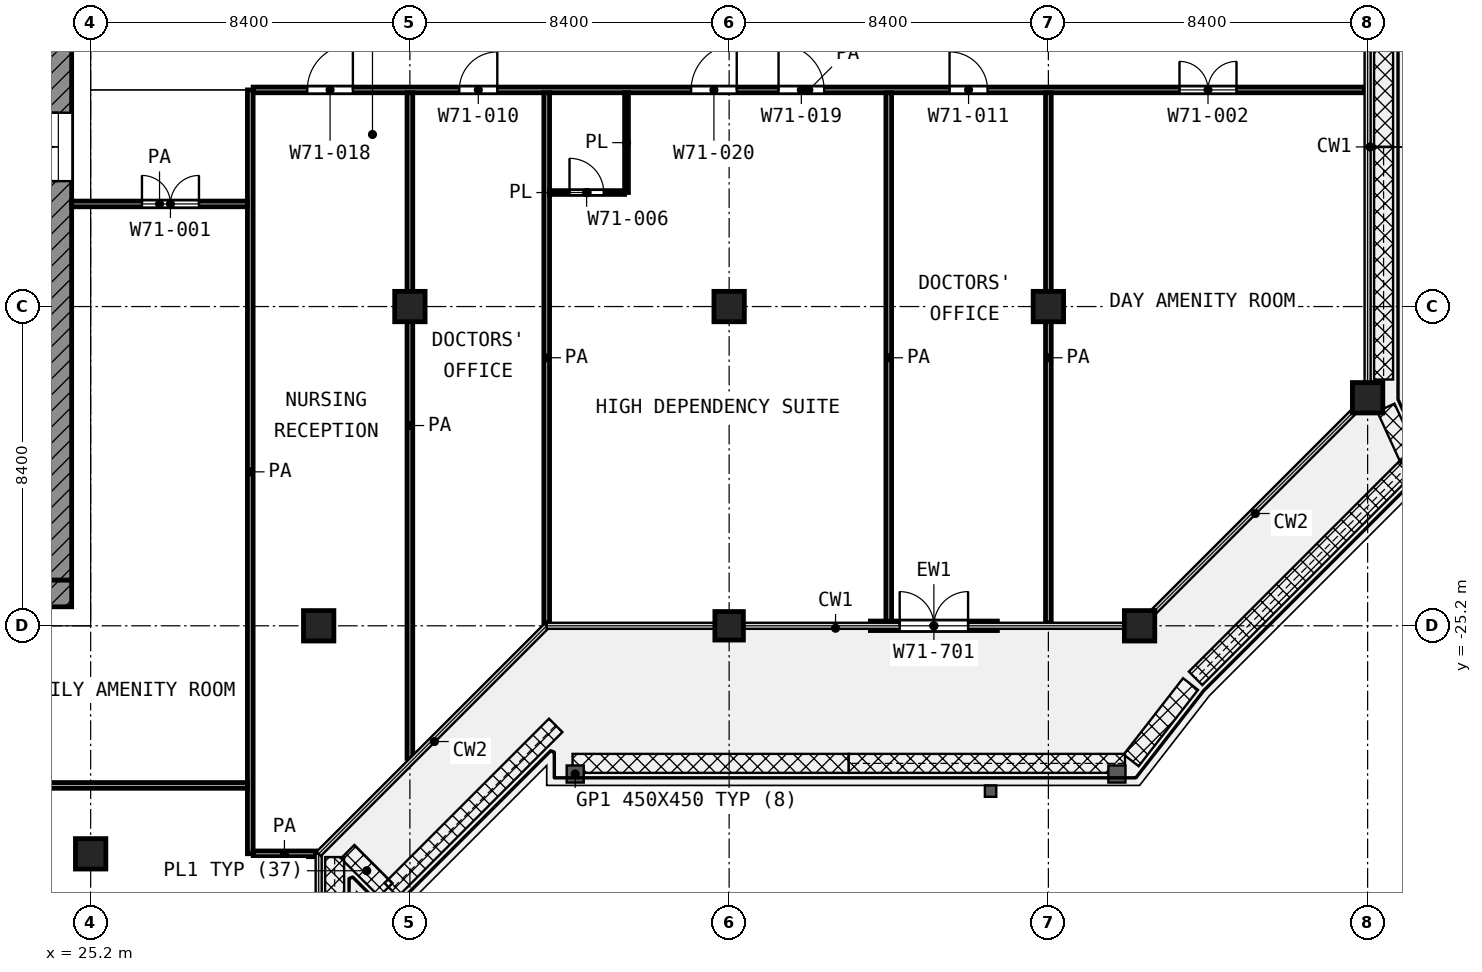
"""IFC4 building model, lengths in metres.
Left out: names, types, materials, properties, quantities, classifications, styles, units other than length and angle.
Written with IfcOpenShell. Run it as: python <this file> out.ifc"""

import sys

from ifc_helpers import new_model, si_unit, direction, frame, frame_2d, origin, origin_2d, place, context, subcontext, project, spatial, rectangle, extrude, element, fill, save


model = new_model("IFC4")
c1 = context("Model", 3, precision=1e-05, world=origin(), true_north=direction((0.0, 1.0)))
c2 = subcontext(c1, "Body", "Model", "MODEL_VIEW")
j1 = project(units=[si_unit("LENGTHUNIT", "METRE"), si_unit("PLANEANGLEUNIT", "RADIAN")], contexts=[c1])
p1 = place(None, origin())
s1 = spatial("IfcSite", under=j1, at=p1, CompositionType="ELEMENT")
p2 = place(p1, origin())
s2 = spatial("IfcBuilding", under=s1, at=p2, CompositionType="ELEMENT")
p3 = place(p2, frame((0.0, 0.0, 307.0)))
s3 = spatial("IfcBuildingStorey", under=s2, at=p3, CompositionType="ELEMENT", Elevation=307.0)
for number, where, z_axis, x_axis in (
    (1, (33.6, -16.8, 0.0), (0.0, 0.0, 1.0), (1.0, 0.0, 0.0)),
    (2, (42.0, -16.8, 0.0), (0.0, 0.0, 1.0), (1.0, 0.0, 0.0)),
    (3, (50.4, -16.8, 0.0), (0.0, 0.0, 1.0), (1.0, 0.0, 0.0)),
    (4, (58.8, -19.2, 0.0), (0.0, 0.0, 1.0), (1.0, 0.0, 0.0)),
    (5, (31.2, -25.2, 0.0), (0.0, 0.0, 1.0), (1.0, 0.0, 0.0)),
):
    element("IfcColumn", number, at=place(p3, frame(where, z_axis=z_axis, x_axis=x_axis)), inside=s3, PredefinedType="COLUMN", context=c2, shape_type="SweptSolid", body=[
        extrude(rectangle(XDim=0.8, YDim=0.8, at=origin_2d()), origin(), (0.0, 0.0, 1.0), 4.2),
    ])
p4 = place(p3, frame((42.0, -25.2, 0.0), z_axis=(0.0, 0.0, 1.0), x_axis=(1.0, 0.0, 0.0)))
e6 = element("IfcColumn", 6, at=p4, inside=s3, PredefinedType="COLUMN", context=c2, shape_type="SweptSolid", body=[
    extrude(rectangle(XDim=0.75, YDim=0.75, at=origin_2d()), origin(), (0.0, 0.0, 1.0), 4.2),
])
for number, where, z_axis, x_axis in (
    (7, (52.8, -25.2, 0.0), (0.0, 0.0, 1.0), (1.0, 0.0, 0.0)),
    (8, (25.2, -31.2, 0.0), (0.0, 0.0, 1.0), (1.0, 0.0, 0.0)),
):
    element("IfcColumn", number, at=place(p3, frame(where, z_axis=z_axis, x_axis=x_axis)), inside=s3, PredefinedType="COLUMN", context=c2, shape_type="SweptSolid", body=[
        extrude(rectangle(XDim=0.8, YDim=0.8, at=origin_2d()), origin(), (0.0, 0.0, 1.0), 4.2),
    ])
p5 = place(p3, frame((45.717, -25.2, 0.0), z_axis=(0.0, 0.0, 1.0), x_axis=(1.0, 0.0, 0.0)))
e9 = element("IfcWall", 9, at=p5, inside=s3, PredefinedType="SOLIDWALL", context=c2, shape_type="SweptSolid", body=[
    extrude(rectangle(XDim=3.342, YDim=0.25, at=frame_2d((1.671, 0.0))), origin(), (0.0, 0.0, 1.0), 3.48),
])
p6 = place(p5, frame((0.771, 0.0, 0.0)))
e10 = element("IfcOpeningElement", 10, at=p6, cuts=e9, PredefinedType="OPENING", context=c2, shape_type="SweptSolid", body=[
    extrude(rectangle(XDim=1.8, YDim=2.1, at=frame_2d((0.9, 1.05))), frame((0.0, 0.135, 0.0), z_axis=(0.0, -1.0, 0.0), x_axis=(1.0, 0.0, 0.0)), (0.0, 0.0, 1.0), 0.27),
])
p7 = place(p3, frame((24.35, -24.0, 0.0), z_axis=(0.0, 0.0, 1.0), x_axis=(0.0, 1.0, 0.0)))
e11 = element("IfcWall", 11, at=p7, inside=s3, PredefinedType="SHEAR", context=c2, shape_type="SweptSolid", body=[
    extrude(rectangle(XDim=18.6, YDim=0.7, at=frame_2d((9.3, 0.0))), origin(), (0.0, 0.0, 1.0), 3.6),
])
p8 = place(p7, frame((10.5, 0.0, 0.0)))
e12 = element("IfcOpeningElement", 12, at=p8, cuts=e11, PredefinedType="OPENING", context=c2, shape_type="SweptSolid", body=[
    extrude(rectangle(XDim=1.8, YDim=2.1, at=frame_2d((0.9, 1.05))), frame((0.0, 0.36, 0.0), z_axis=(0.0, -1.0, 0.0), x_axis=(1.0, 0.0, 0.0)), (0.0, 0.0, 1.0), 0.72),
])
p9 = place(p3, frame((24.35, -24.7, 0.0), z_axis=(0.0, 0.0, 1.0), x_axis=(0.0, 1.0, 0.0)))
e13 = element("IfcWall", 13, at=p9, inside=s3, PredefinedType="SHEAR", context=c2, shape_type="SweptSolid", body=[
    extrude(rectangle(XDim=0.7, YDim=0.7, at=frame_2d((0.35, 0.0))), origin(), (0.0, 0.0, 1.0), 3.6),
])
p10 = place(p3, frame((37.275, -13.8, 0.0), z_axis=(0.0, 0.0, 1.0), x_axis=(1.0, 0.0, 0.0)))
e14 = element("IfcWall", 14, at=p10, inside=s3, PredefinedType="PARTITIONING", context=c2, shape_type="SweptSolid", body=[
    extrude(rectangle(XDim=1.975, YDim=0.1, at=frame_2d((0.988, 0.0))), origin(), (0.0, 0.0, 1.0), 3.6),
])
p11 = place(p10, frame((0.525, 0.0, 0.0)))
e15 = element("IfcOpeningElement", 15, at=p11, cuts=e14, PredefinedType="OPENING", context=c2, shape_type="SweptSolid", body=[
    extrude(rectangle(XDim=0.9, YDim=2.1, at=frame_2d((0.45, 1.05))), frame((0.0, 0.06, 0.0), z_axis=(0.0, -1.0, 0.0), x_axis=(1.0, 0.0, 0.0)), (0.0, 0.0, 1.0), 0.12),
])
p12 = place(p3, frame((39.3, -13.8, 0.0), z_axis=(0.0, 0.0, 1.0), x_axis=(0.0, 1.0, 0.0)))
e16 = element("IfcWall", 16, at=p12, inside=s3, PredefinedType="PARTITIONING", context=c2, shape_type="SweptSolid", body=[
    extrude(rectangle(XDim=2.625, YDim=0.1, at=frame_2d((1.312, 0.0))), origin(), (0.0, 0.0, 1.0), 3.6),
])
p13 = place(p3, frame((29.477, -31.2, 0.0), z_axis=(0.0, 0.0, 1.0), x_axis=(1.0, 0.0, 0.0)))
e17 = element("IfcWall", 17, at=p13, inside=s3, PredefinedType="PARTITIONING", context=c2, shape_type="SweptSolid", body=[
    extrude(rectangle(XDim=1.643, YDim=0.15, at=frame_2d((0.822, 0.0))), origin(), (0.0, 0.0, 1.0), 3.6),
])
p14 = place(p3, frame((11.175, -29.4, 0.0), z_axis=(0.0, 0.0, 1.0), x_axis=(1.0, 0.0, 0.0)))
e18 = element("IfcWall", 18, at=p14, inside=s3, PredefinedType="PARTITIONING", context=c2, shape_type="SweptSolid", body=[
    extrude(rectangle(XDim=18.15, YDim=0.15, at=frame_2d((9.075, 0.0))), origin(), (0.0, 0.0, 1.0), 3.6),
])
p15 = place(p3, frame((24.7, -14.1, 0.0), z_axis=(0.0, 0.0, 1.0), x_axis=(1.0, 0.0, 0.0)))
e19 = element("IfcWall", 19, at=p15, inside=s3, PredefinedType="PARTITIONING", context=c2, shape_type="SweptSolid", body=[
    extrude(rectangle(XDim=4.625, YDim=0.15, at=frame_2d((2.312, 0.0))), origin(), (0.0, 0.0, 1.0), 3.6),
])
p16 = place(p15, frame((1.85, 0.0, 0.0)))
e20 = element("IfcOpeningElement", 20, at=p16, cuts=e19, PredefinedType="OPENING", context=c2, shape_type="SweptSolid", body=[
    extrude(rectangle(XDim=1.5, YDim=2.1, at=frame_2d((0.75, 1.05))), frame((0.0, 0.085, 0.0), z_axis=(0.0, -1.0, 0.0), x_axis=(1.0, 0.0, 0.0)), (0.0, 0.0, 1.0), 0.17),
])
p17 = place(p3, frame((29.475, -11.1, 0.0), z_axis=(0.0, 0.0, 1.0), x_axis=(1.0, 0.0, 0.0)))
e21 = element("IfcWall", 21, at=p17, inside=s3, PredefinedType="PARTITIONING", context=c2, shape_type="SweptSolid", body=[
    extrude(rectangle(XDim=29.245, YDim=0.15, at=frame_2d((14.623, 0.0))), origin(), (0.0, 0.0, 1.0), 3.6),
])
p18 = place(p17, frame((1.425, 0.0, 0.0)))
e22 = element("IfcOpeningElement", 22, at=p18, cuts=e21, PredefinedType="OPENING", context=c2, shape_type="SweptSolid", body=[
    extrude(rectangle(XDim=1.2, YDim=2.1, at=frame_2d((0.6, 1.05))), frame((0.0, 0.085, 0.0), z_axis=(0.0, -1.0, 0.0), x_axis=(1.0, 0.0, 0.0)), (0.0, 0.0, 1.0), 0.17),
])
p19 = place(p17, frame((5.425, 0.0, 0.0)))
e23 = element("IfcOpeningElement", 23, at=p19, cuts=e21, PredefinedType="OPENING", context=c2, shape_type="SweptSolid", body=[
    extrude(rectangle(XDim=1.0, YDim=2.1, at=frame_2d((0.5, 1.05))), frame((0.0, 0.085, 0.0), z_axis=(0.0, -1.0, 0.0), x_axis=(1.0, 0.0, 0.0)), (0.0, 0.0, 1.0), 0.17),
])
p20 = place(p17, frame((13.825, 0.0, 0.0)))
e24 = element("IfcOpeningElement", 24, at=p20, cuts=e21, PredefinedType="OPENING", context=c2, shape_type="SweptSolid", body=[
    extrude(rectangle(XDim=1.2, YDim=2.1, at=frame_2d((0.6, 1.05))), frame((0.0, 0.085, 0.0), z_axis=(0.0, -1.0, 0.0), x_axis=(1.0, 0.0, 0.0)), (0.0, 0.0, 1.0), 0.17),
])
p21 = place(p17, frame((11.525, 0.0, 0.0)))
e25 = element("IfcOpeningElement", 25, at=p21, cuts=e21, PredefinedType="OPENING", context=c2, shape_type="SweptSolid", body=[
    extrude(rectangle(XDim=1.2, YDim=2.1, at=frame_2d((0.6, 1.05))), frame((0.0, 0.085, 0.0), z_axis=(0.0, -1.0, 0.0), x_axis=(1.0, 0.0, 0.0)), (0.0, 0.0, 1.0), 0.17),
])
p22 = place(p17, frame((18.325, 0.0, 0.0)))
e26 = element("IfcOpeningElement", 26, at=p22, cuts=e21, PredefinedType="OPENING", context=c2, shape_type="SweptSolid", body=[
    extrude(rectangle(XDim=1.0, YDim=2.1, at=frame_2d((0.5, 1.05))), frame((0.0, 0.085, 0.0), z_axis=(0.0, -1.0, 0.0), x_axis=(1.0, 0.0, 0.0)), (0.0, 0.0, 1.0), 0.17),
])
p23 = place(p17, frame((24.375, 0.0, 0.0)))
e27 = element("IfcOpeningElement", 27, at=p23, cuts=e21, PredefinedType="OPENING", context=c2, shape_type="SweptSolid", body=[
    extrude(rectangle(XDim=1.5, YDim=2.1, at=frame_2d((0.75, 1.05))), frame((0.0, 0.085, 0.0), z_axis=(0.0, -1.0, 0.0), x_axis=(1.0, 0.0, 0.0)), (0.0, 0.0, 1.0), 0.17),
])
p24 = place(p3, frame((29.4, -31.198, 0.0), z_axis=(0.0, 0.0, 1.0), x_axis=(0.0, 1.0, 0.0)))
e28 = element("IfcWall", 28, at=p24, inside=s3, PredefinedType="PARTITIONING", context=c2, shape_type="SweptSolid", body=[
    extrude(rectangle(XDim=20.098, YDim=0.15, at=frame_2d((10.049, 0.0))), origin(), (0.0, 0.0, 1.0), 3.6),
])
p25 = place(p3, frame((33.6, -28.687, 0.0), z_axis=(0.0, 0.0, 1.0), x_axis=(0.0, 1.0, 0.0)))
e29 = element("IfcWall", 29, at=p25, inside=s3, PredefinedType="PARTITIONING", context=c2, shape_type="SweptSolid", body=[
    extrude(rectangle(XDim=17.512, YDim=0.15, at=frame_2d((8.756, 0.0))), origin(), (0.0, 0.0, 1.0), 3.6),
])
for number, where, z_axis, x_axis in (
    (30, (37.2, -25.12, 0.0), (0.0, 0.0, 1.0), (0.0, 1.0, 0.0)),
    (31, (46.2, -25.12, 0.0), (0.0, 0.0, 1.0), (0.0, 1.0, 0.0)),
    (32, (50.4, -25.12, 0.0), (0.0, 0.0, 1.0), (0.0, 1.0, 0.0)),
):
    element("IfcWall", number, at=place(p3, frame(where, z_axis=z_axis, x_axis=x_axis)), inside=s3, PredefinedType="PARTITIONING", context=c2, shape_type="SweptSolid", body=[
        extrude(rectangle(XDim=13.945, YDim=0.15, at=frame_2d((6.973, 0.0))), origin(), (0.0, 0.0, 1.0), 3.6),
    ])
p26 = place(p6, origin())
e33 = element("IfcDoor", 33, at=p26, inside=s3, OperationType="DOUBLE_DOOR_SINGLE_SWING", PredefinedType="DOOR", context=c2, shape_type="SweptSolid", body=[
    extrude(rectangle(XDim=1.8, YDim=2.1, at=frame_2d((0.9, 1.05))), frame((0.0, 0.025, 0.0), z_axis=(0.0, -1.0, 0.0), x_axis=(1.0, 0.0, 0.0)), (0.0, 0.0, 1.0), 0.05),
])
fill(e10, e33)
p27 = place(p8, origin())
e34 = element("IfcDoor", 34, at=p27, inside=s3, OperationType="DOUBLE_DOOR_SINGLE_SWING", PredefinedType="DOOR", context=c2, shape_type="SweptSolid", body=[
    extrude(rectangle(XDim=1.8, YDim=2.1, at=frame_2d((0.9, 1.05))), frame((0.0, 0.025, 0.0), z_axis=(0.0, -1.0, 0.0), x_axis=(1.0, 0.0, 0.0)), (0.0, 0.0, 1.0), 0.05),
])
fill(e12, e34)
p28 = place(p16, origin())
e35 = element("IfcDoor", 35, at=p28, inside=s3, OperationType="DOUBLE_DOOR_SINGLE_SWING", PredefinedType="DOOR", context=c2, shape_type="SweptSolid", body=[
    extrude(rectangle(XDim=1.5, YDim=2.1, at=frame_2d((0.75, 1.05))), frame((0.0, 0.025, 0.0), z_axis=(0.0, -1.0, 0.0), x_axis=(1.0, 0.0, 0.0)), (0.0, 0.0, 1.0), 0.05),
])
fill(e20, e35)
p29 = place(p18, origin())
e36 = element("IfcDoor", 36, at=p29, inside=s3, OperationType="SINGLE_SWING_RIGHT", PredefinedType="DOOR", context=c2, shape_type="SweptSolid", body=[
    extrude(rectangle(XDim=1.2, YDim=2.1, at=frame_2d((0.6, 1.05))), frame((0.0, 0.025, 0.0), z_axis=(0.0, -1.0, 0.0), x_axis=(1.0, 0.0, 0.0)), (0.0, 0.0, 1.0), 0.05),
])
fill(e22, e36)
p30 = place(p19, origin())
e37 = element("IfcDoor", 37, at=p30, inside=s3, OperationType="SINGLE_SWING_RIGHT", PredefinedType="DOOR", context=c2, shape_type="SweptSolid", body=[
    extrude(rectangle(XDim=1.0, YDim=2.1, at=frame_2d((0.5, 1.05))), frame((0.0, 0.025, 0.0), z_axis=(0.0, -1.0, 0.0), x_axis=(1.0, 0.0, 0.0)), (0.0, 0.0, 1.0), 0.05),
])
fill(e23, e37)
p31 = place(p20, origin())
e38 = element("IfcDoor", 38, at=p31, inside=s3, OperationType="SINGLE_SWING_LEFT", PredefinedType="DOOR", context=c2, shape_type="SweptSolid", body=[
    extrude(rectangle(XDim=1.2, YDim=2.1, at=frame_2d((0.6, 1.05))), frame((0.0, 0.025, 0.0), z_axis=(0.0, -1.0, 0.0), x_axis=(1.0, 0.0, 0.0)), (0.0, 0.0, 1.0), 0.05),
])
fill(e24, e38)
p32 = place(p21, origin())
e39 = element("IfcDoor", 39, at=p32, inside=s3, OperationType="SINGLE_SWING_RIGHT", PredefinedType="DOOR", context=c2, shape_type="SweptSolid", body=[
    extrude(rectangle(XDim=1.2, YDim=2.1, at=frame_2d((0.6, 1.05))), frame((0.0, 0.025, 0.0), z_axis=(0.0, -1.0, 0.0), x_axis=(1.0, 0.0, 0.0)), (0.0, 0.0, 1.0), 0.05),
])
fill(e25, e39)
p33 = place(p11, origin())
e40 = element("IfcDoor", 40, at=p33, inside=s3, OperationType="SINGLE_SWING_LEFT", PredefinedType="DOOR", context=c2, shape_type="SweptSolid", body=[
    extrude(rectangle(XDim=0.9, YDim=2.1, at=frame_2d((0.45, 1.05))), frame((0.0, 0.025, 0.0), z_axis=(0.0, -1.0, 0.0), x_axis=(1.0, 0.0, 0.0)), (0.0, 0.0, 1.0), 0.05),
])
fill(e15, e40)
p34 = place(p22, origin())
e41 = element("IfcDoor", 41, at=p34, inside=s3, OperationType="SINGLE_SWING_LEFT", PredefinedType="DOOR", context=c2, shape_type="SweptSolid", body=[
    extrude(rectangle(XDim=1.0, YDim=2.1, at=frame_2d((0.5, 1.05))), frame((0.0, 0.025, 0.0), z_axis=(0.0, -1.0, 0.0), x_axis=(1.0, 0.0, 0.0)), (0.0, 0.0, 1.0), 0.05),
])
fill(e26, e41)
p35 = place(p23, origin())
e42 = element("IfcDoor", 42, at=p35, inside=s3, OperationType="DOUBLE_DOOR_SINGLE_SWING", PredefinedType="DOOR", context=c2, shape_type="SweptSolid", body=[
    extrude(rectangle(XDim=1.5, YDim=2.1, at=frame_2d((0.75, 1.05))), frame((0.0, 0.025, 0.0), z_axis=(0.0, -1.0, 0.0), x_axis=(1.0, 0.0, 0.0)), (0.0, 0.0, 1.0), 0.05),
])
fill(e27, e42)
save(model, sys.argv[1])
